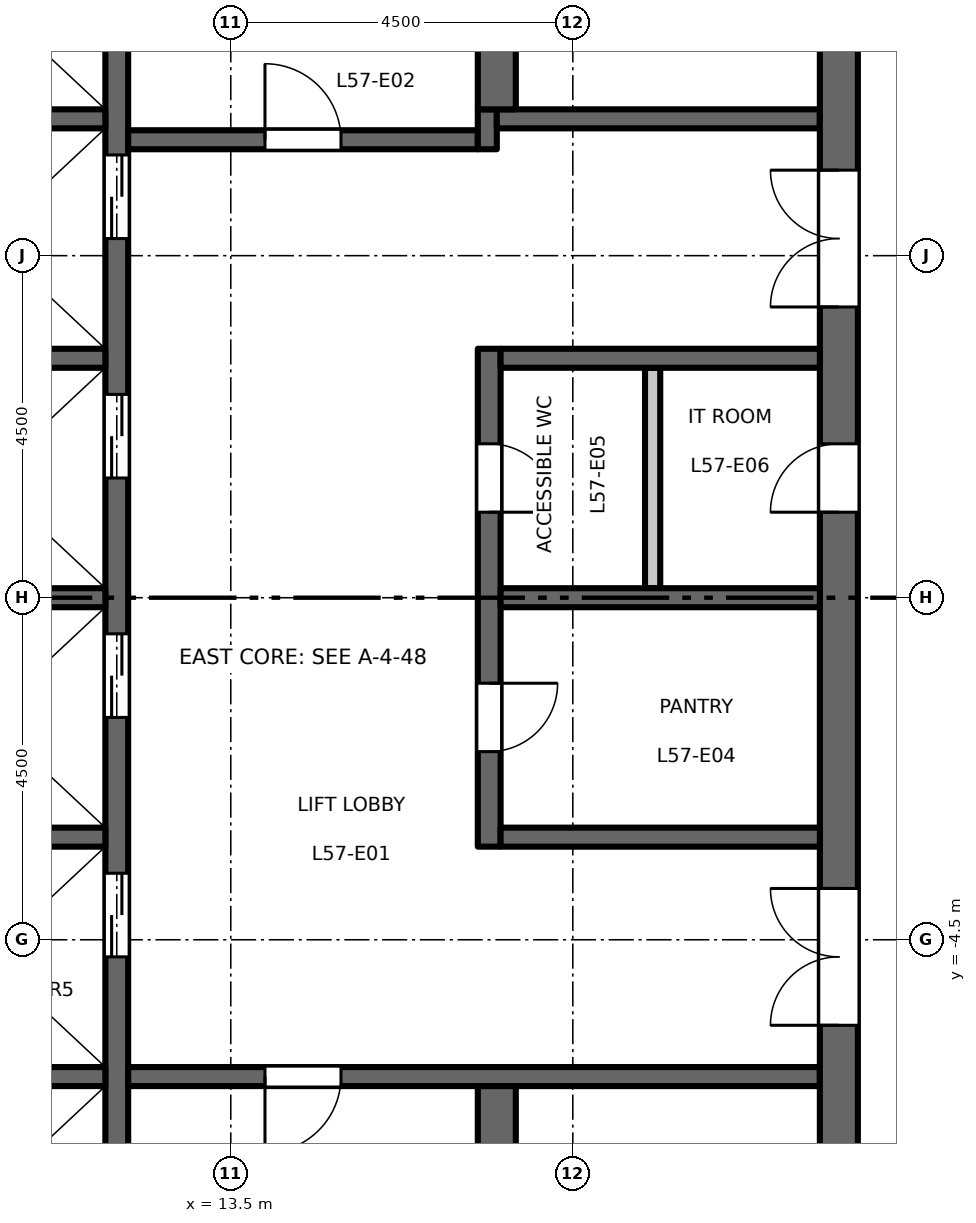
"""IFC4 building model, lengths in metres.
Left out: names, types, materials, properties, quantities, classifications, styles, units other than length and angle.
Written with IfcOpenShell. Run it as: python <this file> out.ifc"""

import sys

from ifc_helpers import new_model, si_unit, direction, frame, frame_2d, origin, place, context, subcontext, project, spatial, rectangle, extrude, element, fill, save


model = new_model("IFC4")
c1 = context("Model", 3, precision=1e-05, world=origin(), true_north=direction((0.0, 1.0)))
c2 = subcontext(c1, "Body", "Model", "MODEL_VIEW")
j1 = project(units=[si_unit("LENGTHUNIT", "METRE"), si_unit("PLANEANGLEUNIT", "RADIAN")], contexts=[c1])
p1 = place(None, origin())
s1 = spatial("IfcSite", under=j1, at=p1, CompositionType="ELEMENT")
p2 = place(p1, origin())
s2 = spatial("IfcBuilding", under=s1, at=p2, CompositionType="ELEMENT")
p3 = place(p2, frame((0.0, 0.0, 264.7)))
s3 = spatial("IfcBuildingStorey", under=s2, at=p3, CompositionType="ELEMENT", Elevation=264.7)
p4 = place(p3, frame((12.0, -9.45, 0.0), z_axis=(0.0, 0.0, 1.0), x_axis=(0.0, 1.0, 0.0)))
e1 = element("IfcWall", 1, at=p4, inside=s3, PredefinedType="SHEAR", context=c2, shape_type="SweptSolid", body=[
    extrude(rectangle(XDim=18.9, YDim=0.3, at=frame_2d((9.45, 0.0))), origin(), (0.0, 0.0, 1.0), 4.35),
])
p5 = place(p4, frame((4.725, 0.0, 0.0)))
e2 = element("IfcOpeningElement", 2, at=p5, cuts=e1, PredefinedType="OPENING", context=c2, shape_type="SweptSolid", body=[
    extrude(rectangle(XDim=1.1, YDim=2.1, at=frame_2d((0.55, 1.05))), frame((0.0, 0.16, 0.0), z_axis=(0.0, -1.0, 0.0), x_axis=(1.0, 0.0, 0.0)), (0.0, 0.0, 1.0), 0.32),
])
p6 = place(p4, frame((7.875, 0.0, 0.0)))
e3 = element("IfcOpeningElement", 3, at=p6, cuts=e1, PredefinedType="OPENING", context=c2, shape_type="SweptSolid", body=[
    extrude(rectangle(XDim=1.1, YDim=2.1, at=frame_2d((0.55, 1.05))), frame((0.0, 0.16, 0.0), z_axis=(0.0, -1.0, 0.0), x_axis=(1.0, 0.0, 0.0)), (0.0, 0.0, 1.0), 0.32),
])
p7 = place(p4, frame((11.025, 0.0, 0.0)))
e4 = element("IfcOpeningElement", 4, at=p7, cuts=e1, PredefinedType="OPENING", context=c2, shape_type="SweptSolid", body=[
    extrude(rectangle(XDim=1.1, YDim=2.1, at=frame_2d((0.55, 1.05))), frame((0.0, 0.16, 0.0), z_axis=(0.0, -1.0, 0.0), x_axis=(1.0, 0.0, 0.0)), (0.0, 0.0, 1.0), 0.32),
])
p8 = place(p4, frame((14.175, 0.0, 0.0)))
e5 = element("IfcOpeningElement", 5, at=p8, cuts=e1, PredefinedType="OPENING", context=c2, shape_type="SweptSolid", body=[
    extrude(rectangle(XDim=1.1, YDim=2.1, at=frame_2d((0.55, 1.05))), frame((0.0, 0.16, 0.0), z_axis=(0.0, -1.0, 0.0), x_axis=(1.0, 0.0, 0.0)), (0.0, 0.0, 1.0), 0.32),
])
p9 = place(p4, frame((16.725, 0.0, 0.0)))
e6 = element("IfcOpeningElement", 6, at=p9, cuts=e1, PredefinedType="OPENING", context=c2, shape_type="SweptSolid", body=[
    extrude(rectangle(XDim=1.2, YDim=2.1, at=frame_2d((0.6, 1.05))), frame((0.0, 0.16, 0.0), z_axis=(0.0, -1.0, 0.0), x_axis=(1.0, 0.0, 0.0)), (0.0, 0.0, 1.0), 0.32),
])
p10 = place(p4, frame((0.975, 0.0, 0.0)))
e7 = element("IfcOpeningElement", 7, at=p10, cuts=e1, PredefinedType="OPENING", context=c2, shape_type="SweptSolid", body=[
    extrude(rectangle(XDim=1.2, YDim=2.1, at=frame_2d((0.6, 1.05))), frame((0.0, 0.16, 0.0), z_axis=(0.0, -1.0, 0.0), x_axis=(1.0, 0.0, 0.0)), (0.0, 0.0, 1.0), 0.32),
])
p11 = place(p3, frame((12.15, 6.025, 0.0), z_axis=(0.0, 0.0, 1.0), x_axis=(1.0, 0.0, 0.0)))
e8 = element("IfcWall", 8, at=p11, inside=s3, PredefinedType="SHEAR", context=c2, shape_type="SweptSolid", body=[
    extrude(rectangle(XDim=4.6, YDim=0.25, at=frame_2d((2.3, 0.0))), origin(), (0.0, 0.0, 1.0), 4.35),
])
p12 = place(p11, frame((1.8, 0.0, 0.0)))
e9 = element("IfcOpeningElement", 9, at=p12, cuts=e8, PredefinedType="OPENING", context=c2, shape_type="SweptSolid", body=[
    extrude(rectangle(XDim=1.0, YDim=2.1, at=frame_2d((0.5, 1.05))), frame((0.0, 0.135, 0.0), z_axis=(0.0, -1.0, 0.0), x_axis=(1.0, 0.0, 0.0)), (0.0, 0.0, 1.0), 0.27),
])
p13 = place(p3, frame((16.875, 5.9, 0.0), z_axis=(0.0, 0.0, 1.0), x_axis=(0.0, 1.0, 0.0)))
e10 = element("IfcWall", 10, at=p13, inside=s3, PredefinedType="SHEAR", context=c2, shape_type="SweptSolid", body=[
    extrude(rectangle(XDim=0.525, YDim=0.25, at=frame_2d((0.263, 0.0))), origin(), (0.0, 0.0, 1.0), 4.35),
])
p14 = place(p3, frame((17.0, 6.3, 0.0), z_axis=(0.0, 0.0, 1.0), x_axis=(1.0, 0.0, 0.0)))
e11 = element("IfcWall", 11, at=p14, inside=s3, PredefinedType="SHEAR", context=c2, shape_type="SweptSolid", body=[
    extrude(rectangle(XDim=4.25, YDim=0.25, at=frame_2d((2.125, 0.0))), origin(), (0.0, 0.0, 1.0), 4.35),
])
p15 = place(p3, frame((12.15, -6.3, 0.0), z_axis=(0.0, 0.0, 1.0), x_axis=(1.0, 0.0, 0.0)))
e12 = element("IfcWall", 12, at=p15, inside=s3, PredefinedType="SHEAR", context=c2, shape_type="SweptSolid", body=[
    extrude(rectangle(XDim=9.1, YDim=0.25, at=frame_2d((4.55, 0.0))), origin(), (0.0, 0.0, 1.0), 4.35),
])
p16 = place(p15, frame((1.8, 0.0, 0.0)))
e13 = element("IfcOpeningElement", 13, at=p16, cuts=e12, PredefinedType="OPENING", context=c2, shape_type="SweptSolid", body=[
    extrude(rectangle(XDim=1.0, YDim=2.1, at=frame_2d((0.5, 1.05))), frame((0.0, 0.135, 0.0), z_axis=(0.0, -1.0, 0.0), x_axis=(1.0, 0.0, 0.0)), (0.0, 0.0, 1.0), 0.27),
])
p17 = place(p3, frame((21.5, -13.0, 0.0), z_axis=(0.0, 0.0, 1.0), x_axis=(0.0, 1.0, 0.0)))
e14 = element("IfcWall", 14, at=p17, inside=s3, PredefinedType="SHEAR", context=c2, shape_type="SweptSolid", body=[
    extrude(rectangle(XDim=26.0, YDim=0.5, at=frame_2d((13.0, 0.0))), origin(), (0.0, 0.0, 1.0), 4.35),
])
p18 = place(p17, frame((16.825, 0.0, 0.0)))
e15 = element("IfcOpeningElement", 15, at=p18, cuts=e14, PredefinedType="OPENING", context=c2, shape_type="SweptSolid", body=[
    extrude(rectangle(XDim=1.8, YDim=2.1, at=frame_2d((0.9, 1.05))), frame((0.0, 0.26, 0.0), z_axis=(0.0, -1.0, 0.0), x_axis=(1.0, 0.0, 0.0)), (0.0, 0.0, 1.0), 0.52),
])
p19 = place(p17, frame((7.375, 0.0, 0.0)))
e16 = element("IfcOpeningElement", 16, at=p19, cuts=e14, PredefinedType="OPENING", context=c2, shape_type="SweptSolid", body=[
    extrude(rectangle(XDim=1.8, YDim=2.1, at=frame_2d((0.9, 1.05))), frame((0.0, 0.26, 0.0), z_axis=(0.0, -1.0, 0.0), x_axis=(1.0, 0.0, 0.0)), (0.0, 0.0, 1.0), 0.52),
])
p20 = place(p17, frame((14.125, 0.0, 0.0)))
e17 = element("IfcOpeningElement", 17, at=p20, cuts=e14, PredefinedType="OPENING", context=c2, shape_type="SweptSolid", body=[
    extrude(rectangle(XDim=0.9, YDim=2.1, at=frame_2d((0.45, 1.05))), frame((0.0, 0.26, 0.0), z_axis=(0.0, -1.0, 0.0), x_axis=(1.0, 0.0, 0.0)), (0.0, 0.0, 1.0), 0.52),
])
p21 = place(p3, frame((16.9, -3.275, 0.0), z_axis=(0.0, 0.0, 1.0), x_axis=(0.0, 1.0, 0.0)))
e18 = element("IfcWall", 18, at=p21, inside=s3, PredefinedType="SHEAR", context=c2, shape_type="SweptSolid", body=[
    extrude(rectangle(XDim=6.55, YDim=0.3, at=frame_2d((3.275, 0.0))), origin(), (0.0, 0.0, 1.0), 4.35),
])
p22 = place(p21, frame((1.25, 0.0, 0.0)))
e19 = element("IfcOpeningElement", 19, at=p22, cuts=e18, PredefinedType="OPENING", context=c2, shape_type="SweptSolid", body=[
    extrude(rectangle(XDim=0.9, YDim=2.1, at=frame_2d((0.45, 1.05))), frame((0.0, 0.16, 0.0), z_axis=(0.0, -1.0, 0.0), x_axis=(1.0, 0.0, 0.0)), (0.0, 0.0, 1.0), 0.32),
])
p23 = place(p21, frame((4.4, 0.0, 0.0)))
e20 = element("IfcOpeningElement", 20, at=p23, cuts=e18, PredefinedType="OPENING", context=c2, shape_type="SweptSolid", body=[
    extrude(rectangle(XDim=0.9, YDim=2.1, at=frame_2d((0.45, 1.05))), frame((0.0, 0.16, 0.0), z_axis=(0.0, -1.0, 0.0), x_axis=(1.0, 0.0, 0.0)), (0.0, 0.0, 1.0), 0.32),
])
for number, where, z_axis, x_axis in (
    (21, (17.05, 0.0, 0.0), (0.0, 0.0, 1.0), (1.0, 0.0, 0.0)),
    (22, (17.05, 3.15, 0.0), (0.0, 0.0, 1.0), (1.0, 0.0, 0.0)),
    (23, (17.05, -3.15, 0.0), (0.0, 0.0, 1.0), (1.0, 0.0, 0.0)),
):
    element("IfcWall", number, at=place(p3, frame(where, z_axis=z_axis, x_axis=x_axis)), inside=s3, PredefinedType="SHEAR", context=c2, shape_type="SweptSolid", body=[
        extrude(rectangle(XDim=4.2, YDim=0.25, at=frame_2d((2.1, 0.0))), origin(), (0.0, 0.0, 1.0), 4.35),
    ])
p24 = place(p3, frame((19.05, 0.125, 0.0), z_axis=(0.0, 0.0, 1.0), x_axis=(0.0, 1.0, 0.0)))
e24 = element("IfcWall", 24, at=p24, inside=s3, PredefinedType="PARTITIONING", context=c2, shape_type="SweptSolid", body=[
    extrude(rectangle(XDim=2.9, YDim=0.2, at=frame_2d((1.45, 0.0))), origin(), (0.0, 0.0, 1.0), 4.35),
])
for number, where, z_axis, x_axis in (
    (25, (17.0, 6.425, 0.0), (0.0, 0.0, 1.0), (0.0, 1.0, 0.0)),
    (26, (17.0, -13.0, 0.0), (0.0, 0.0, 1.0), (0.0, 1.0, 0.0)),
):
    element("IfcWall", number, at=place(p3, frame(where, z_axis=z_axis, x_axis=x_axis)), inside=s3, PredefinedType="SHEAR", context=c2, shape_type="SweptSolid", body=[
        extrude(rectangle(XDim=6.575, YDim=0.5, at=frame_2d((3.288, 0.0))), origin(), (0.0, 0.0, 1.0), 4.35),
    ])
for number, where, z_axis, x_axis in (
    (27, (8.75, 0.0, 0.0), (0.0, 0.0, 1.0), (1.0, 0.0, 0.0)),
    (28, (8.75, 3.15, 0.0), (0.0, 0.0, 1.0), (1.0, 0.0, 0.0)),
    (29, (8.75, 6.3, 0.0), (0.0, 0.0, 1.0), (1.0, 0.0, 0.0)),
    (30, (8.75, -3.15, 0.0), (0.0, 0.0, 1.0), (1.0, 0.0, 0.0)),
    (31, (8.75, -6.3, 0.0), (0.0, 0.0, 1.0), (1.0, 0.0, 0.0)),
):
    element("IfcWall", number, at=place(p3, frame(where, z_axis=z_axis, x_axis=x_axis)), inside=s3, PredefinedType="SHEAR", context=c2, shape_type="SweptSolid", body=[
        extrude(rectangle(XDim=3.1, YDim=0.25, at=frame_2d((1.55, 0.0))), origin(), (0.0, 0.0, 1.0), 4.35),
    ])
p25 = place(p12, origin())
e32 = element("IfcDoor", 32, at=p25, inside=s3, OperationType="SINGLE_SWING_RIGHT", PredefinedType="DOOR", context=c2, shape_type="SweptSolid", body=[
    extrude(rectangle(XDim=1.0, YDim=2.1, at=frame_2d((0.5, 1.05))), frame((0.0, 0.025, 0.0), z_axis=(0.0, -1.0, 0.0), x_axis=(1.0, 0.0, 0.0)), (0.0, 0.0, 1.0), 0.05),
])
fill(e9, e32)
p26 = place(p16, origin())
e33 = element("IfcDoor", 33, at=p26, inside=s3, OperationType="SINGLE_SWING_LEFT", PredefinedType="DOOR", context=c2, shape_type="SweptSolid", body=[
    extrude(rectangle(XDim=1.0, YDim=2.1, at=frame_2d((0.5, 1.05))), frame((0.0, 0.025, 0.0), z_axis=(0.0, -1.0, 0.0), x_axis=(1.0, 0.0, 0.0)), (0.0, 0.0, 1.0), 0.05),
])
fill(e13, e33)
p27 = place(p18, origin())
e34 = element("IfcDoor", 34, at=p27, inside=s3, OperationType="DOUBLE_DOOR_DOUBLE_SWING", PredefinedType="DOOR", context=c2, shape_type="SweptSolid", body=[
    extrude(rectangle(XDim=1.8, YDim=2.1, at=frame_2d((0.9, 1.05))), frame((0.0, 0.025, 0.0), z_axis=(0.0, -1.0, 0.0), x_axis=(1.0, 0.0, 0.0)), (0.0, 0.0, 1.0), 0.05),
])
fill(e15, e34)
p28 = place(p19, origin())
e35 = element("IfcDoor", 35, at=p28, inside=s3, OperationType="DOUBLE_DOOR_DOUBLE_SWING", PredefinedType="DOOR", context=c2, shape_type="SweptSolid", body=[
    extrude(rectangle(XDim=1.8, YDim=2.1, at=frame_2d((0.9, 1.05))), frame((0.0, 0.025, 0.0), z_axis=(0.0, -1.0, 0.0), x_axis=(1.0, 0.0, 0.0)), (0.0, 0.0, 1.0), 0.05),
])
fill(e16, e35)
p29 = place(p5, origin())
e36 = element("IfcDoor", 36, at=p29, inside=s3, OperationType="DOUBLE_DOOR_SLIDING", PredefinedType="DOOR", context=c2, shape_type="SweptSolid", body=[
    extrude(rectangle(XDim=1.1, YDim=2.1, at=frame_2d((0.55, 1.05))), frame((0.0, 0.025, 0.0), z_axis=(0.0, -1.0, 0.0), x_axis=(1.0, 0.0, 0.0)), (0.0, 0.0, 1.0), 0.05),
])
fill(e2, e36)
p30 = place(p6, origin())
e37 = element("IfcDoor", 37, at=p30, inside=s3, OperationType="DOUBLE_DOOR_SLIDING", PredefinedType="DOOR", context=c2, shape_type="SweptSolid", body=[
    extrude(rectangle(XDim=1.1, YDim=2.1, at=frame_2d((0.55, 1.05))), frame((0.0, 0.025, 0.0), z_axis=(0.0, -1.0, 0.0), x_axis=(1.0, 0.0, 0.0)), (0.0, 0.0, 1.0), 0.05),
])
fill(e3, e37)
p31 = place(p7, origin())
e38 = element("IfcDoor", 38, at=p31, inside=s3, OperationType="DOUBLE_DOOR_SLIDING", PredefinedType="DOOR", context=c2, shape_type="SweptSolid", body=[
    extrude(rectangle(XDim=1.1, YDim=2.1, at=frame_2d((0.55, 1.05))), frame((0.0, 0.025, 0.0), z_axis=(0.0, -1.0, 0.0), x_axis=(1.0, 0.0, 0.0)), (0.0, 0.0, 1.0), 0.05),
])
fill(e4, e38)
p32 = place(p8, origin())
e39 = element("IfcDoor", 39, at=p32, inside=s3, OperationType="DOUBLE_DOOR_SLIDING", PredefinedType="DOOR", context=c2, shape_type="SweptSolid", body=[
    extrude(rectangle(XDim=1.1, YDim=2.1, at=frame_2d((0.55, 1.05))), frame((0.0, 0.025, 0.0), z_axis=(0.0, -1.0, 0.0), x_axis=(1.0, 0.0, 0.0)), (0.0, 0.0, 1.0), 0.05),
])
fill(e5, e39)
p33 = place(p22, origin())
e40 = element("IfcDoor", 40, at=p33, inside=s3, OperationType="SINGLE_SWING_RIGHT", PredefinedType="DOOR", context=c2, shape_type="SweptSolid", body=[
    extrude(rectangle(XDim=0.9, YDim=2.1, at=frame_2d((0.45, 1.05))), frame((0.0, 0.025, 0.0), z_axis=(0.0, -1.0, 0.0), x_axis=(1.0, 0.0, 0.0)), (0.0, 0.0, 1.0), 0.05),
])
fill(e19, e40)
p34 = place(p23, origin())
e41 = element("IfcDoor", 41, at=p34, inside=s3, OperationType="SINGLE_SWING_LEFT", PredefinedType="DOOR", context=c2, shape_type="SweptSolid", body=[
    extrude(rectangle(XDim=0.9, YDim=2.1, at=frame_2d((0.45, 1.05))), frame((0.0, 0.025, 0.0), z_axis=(0.0, -1.0, 0.0), x_axis=(1.0, 0.0, 0.0)), (0.0, 0.0, 1.0), 0.05),
])
fill(e20, e41)
p35 = place(p20, origin())
e42 = element("IfcDoor", 42, at=p35, inside=s3, OperationType="SINGLE_SWING_RIGHT", PredefinedType="DOOR", context=c2, shape_type="SweptSolid", body=[
    extrude(rectangle(XDim=0.9, YDim=2.1, at=frame_2d((0.45, 1.05))), frame((0.0, 0.025, 0.0), z_axis=(0.0, -1.0, 0.0), x_axis=(1.0, 0.0, 0.0)), (0.0, 0.0, 1.0), 0.05),
])
fill(e17, e42)
save(model, sys.argv[1])
